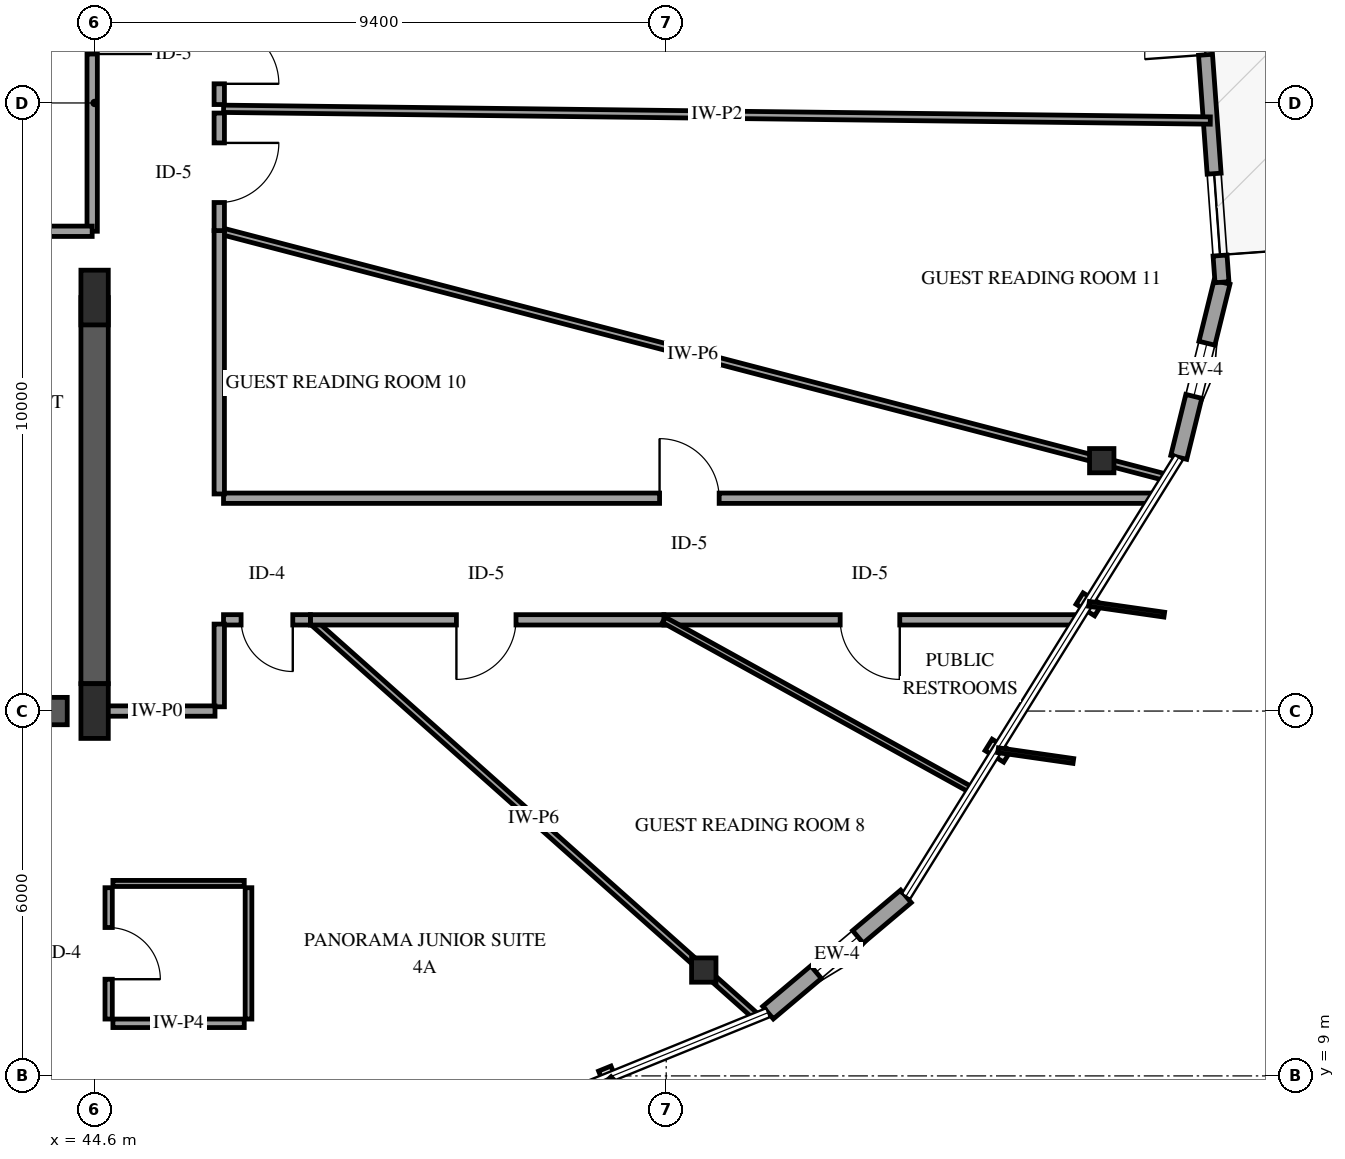
"""IFC4 building model, lengths in metres.
Left out: names, types, materials, properties, quantities, classifications, styles, units other than length and angle.
Written with IfcOpenShell. Run it as: python <this file> out.ifc"""

import sys

from ifc_helpers import new_model, si_unit, direction, frame, frame_2d, origin, origin_2d, place, context, subcontext, project, spatial, rectangle, i_section, extrude, element, fill, save


model = new_model("IFC4")
c1 = context("Model", 3, precision=1e-05, world=origin(), true_north=direction((0.0, 1.0)))
c2 = subcontext(c1, "Body", "Model", "MODEL_VIEW")
j1 = project(units=[si_unit("LENGTHUNIT", "METRE"), si_unit("PLANEANGLEUNIT", "RADIAN")], contexts=[c1])
p1 = place(None, origin())
s1 = spatial("IfcSite", under=j1, at=p1, CompositionType="ELEMENT")
p2 = place(p1, origin())
s2 = spatial("IfcBuilding", under=s1, at=p2, CompositionType="ELEMENT")
p3 = place(p2, frame((0.0, 0.0, 246.25)))
s3 = spatial("IfcBuildingStorey", under=s2, at=p3, CompositionType="ELEMENT", Elevation=246.25)
p4 = place(p3, frame((41.3, 15.0, 0.0), z_axis=(0.0, 0.0, 1.0), x_axis=(1.0, 0.0, 0.0)))
e1 = element("IfcWall", 1, at=p4, inside=s3, PredefinedType="SHEAR", context=c2, shape_type="SweptSolid", body=[
    extrude(rectangle(XDim=2.85, YDim=0.45, at=frame_2d((1.425, 0.0))), origin(), (0.0, 0.0, 1.0), 3.75),
])
p5 = place(p3, frame((44.6, 15.45, 0.0), z_axis=(0.0, 0.0, 1.0), x_axis=(0.0, 1.0, 0.0)))
e2 = element("IfcWall", 2, at=p5, inside=s3, PredefinedType="SHEAR", context=c2, shape_type="SweptSolid", body=[
    extrude(rectangle(XDim=6.35, YDim=0.45, at=frame_2d((3.175, 0.0))), origin(), (0.0, 0.0, 1.0), 3.75),
])
for number, where, z_axis, x_axis in (
    (3, (44.6, 15.0, 0.0), (0.0, 0.0, 1.0), (1.0, 0.0, 0.0)),
    (4, (44.6, 21.8, 0.0), (0.0, 0.0, 1.0), (1.0, 0.0, 0.0)),
):
    element("IfcColumn", number, at=place(p3, frame(where, z_axis=z_axis, x_axis=x_axis)), inside=s3, PredefinedType="PILASTER", context=c2, shape_type="SweptSolid", body=[
        extrude(rectangle(XDim=0.45, YDim=0.9, at=origin_2d()), origin(), (0.0, 0.0, 1.0), 3.75),
    ])
for number, where, z_axis, x_axis in (
    (5, (54.618, 10.74, 0.0), (0.0, 0.0, 1.0), (1.0, 0.0, 0.0)),
    (6, (61.163, 19.117, 0.0), (0.0, 0.0, 1.0), (1.0, 0.0, 0.0)),
):
    element("IfcColumn", number, at=place(p3, frame(where, z_axis=z_axis, x_axis=x_axis)), inside=s3, PredefinedType="COLUMN", context=c2, shape_type="SweptSolid", body=[
        extrude(i_section(OverallWidth=0.401, OverallDepth=0.399, WebThickness=0.025, FlangeThickness=0.04, FilletRadius=0.038, at=origin_2d()), origin(), (0.0, 0.0, 1.0), 3.75),
    ])
p6 = place(p3, frame((55.675, 10.04, 0.0), z_axis=(0.0, 0.0, 1.0), x_axis=(0.764511985062, 0.644609513347, 0.0)))
e7 = element("IfcWall", 7, at=p6, inside=s3, PredefinedType="SOLIDWALL", context=c2, shape_type="SweptSolid", body=[
    extrude(rectangle(XDim=2.967, YDim=0.27, at=frame_2d((1.483, 0.0))), origin(), (0.0, 0.0, 1.0), 2.829),
])
p7 = place(p6, frame((1.033, 0.0, 0.75)))
e8 = element("IfcOpeningElement", 8, at=p7, cuts=e7, PredefinedType="OPENING", context=c2, shape_type="SweptSolid", body=[
    extrude(rectangle(XDim=0.9, YDim=1.5, at=frame_2d((0.45, 0.75))), frame((0.0, 0.145, 0.0), z_axis=(0.0, -1.0, 0.0), x_axis=(1.0, 0.0, 0.0)), (0.0, 0.0, 1.0), 0.29),
])
p8 = place(p3, frame((62.429, 19.172, 0.0), z_axis=(0.0, 0.0, 1.0), x_axis=(0.23949416051, 0.970897804654, 0.0)))
e9 = element("IfcWall", 9, at=p8, inside=s3, PredefinedType="SOLIDWALL", context=c2, shape_type="SweptSolid", body=[
    extrude(rectangle(XDim=2.967, YDim=0.27, at=frame_2d((1.483, 0.0))), origin(), (0.0, 0.0, 1.0), 2.829),
])
p9 = place(p8, frame((1.033, 0.0, 0.75)))
e10 = element("IfcOpeningElement", 10, at=p9, cuts=e9, PredefinedType="OPENING", context=c2, shape_type="SweptSolid", body=[
    extrude(rectangle(XDim=0.9, YDim=1.5, at=frame_2d((0.45, 0.75))), frame((0.0, 0.145, 0.0), z_axis=(0.0, -1.0, 0.0), x_axis=(1.0, 0.0, 0.0)), (0.0, 0.0, 1.0), 0.29),
])
p10 = place(p3, frame((63.14, 22.052, 0.0), z_axis=(0.0, 0.0, 1.0), x_axis=(-0.072181914465, 0.997391483433, 0.0)))
e11 = element("IfcWall", 11, at=p10, inside=s3, PredefinedType="SOLIDWALL", context=c2, shape_type="SweptSolid", body=[
    extrude(rectangle(XDim=8.5, YDim=0.23, at=frame_2d((4.25, 0.0))), origin(), (0.0, 0.0, 1.0), 2.829),
])
p11 = place(p10, frame((3.75, 0.0, 0.0)))
e12 = element("IfcOpeningElement", 12, at=p11, cuts=e11, PredefinedType="OPENING", context=c2, shape_type="SweptSolid", body=[
    extrude(rectangle(XDim=1.0, YDim=2.15, at=frame_2d((0.5, 1.075))), frame((0.0, 0.125, 0.0), z_axis=(0.0, -1.0, 0.0), x_axis=(1.0, 0.0, 0.0)), (0.0, 0.0, 1.0), 0.25),
])
p12 = place(p10, frame((0.44, 0.0, 0.72)))
e13 = element("IfcOpeningElement", 13, at=p12, cuts=e11, PredefinedType="OPENING", context=c2, shape_type="SweptSolid", body=[
    extrude(rectangle(XDim=1.35, YDim=1.65, at=frame_2d((0.675, 0.825))), frame((0.0, 0.125, 0.0), z_axis=(0.0, -1.0, 0.0), x_axis=(1.0, 0.0, 0.0)), (0.0, 0.0, 1.0), 0.25),
])
p13 = place(p10, frame((5.39, 0.0, 0.72)))
e14 = element("IfcOpeningElement", 14, at=p13, cuts=e11, PredefinedType="OPENING", context=c2, shape_type="SweptSolid", body=[
    extrude(rectangle(XDim=1.35, YDim=1.65, at=frame_2d((0.675, 0.825))), frame((0.0, 0.125, 0.0), z_axis=(0.0, -1.0, 0.0), x_axis=(1.0, 0.0, 0.0)), (0.0, 0.0, 1.0), 0.25),
])
p14 = place(p3, frame((62.948, 24.711, 0.0), z_axis=(0.0, 0.0, 1.0), x_axis=(-0.999929192745, 0.011899978808, 0.0)))
e15 = element("IfcWall", 15, at=p14, inside=s3, PredefinedType="PARTITIONING", context=c2, shape_type="SweptSolid", body=[
    extrude(rectangle(XDim=16.228, YDim=0.12, at=frame_2d((8.114, 0.0))), origin(), (0.0, 0.0, 1.0), 3.45),
])
p15 = place(p3, frame((46.65, 22.901, 0.0), z_axis=(0.0, 0.0, 1.0), x_axis=(0.96766316622, -0.252245905303, 0.0)))
e16 = element("IfcWall", 16, at=p15, inside=s3, PredefinedType="PARTITIONING", context=c2, shape_type="SweptSolid", body=[
    extrude(rectangle(XDim=16.095, YDim=0.11, at=frame_2d((8.047, 0.0))), origin(), (0.0, 0.0, 1.0), 3.45),
])
p16 = place(p3, frame((46.72, 18.5, 0.0), z_axis=(0.0, 0.0, 1.0), x_axis=(1.0, 0.0, 0.0)))
e17 = element("IfcWall", 17, at=p16, inside=s3, PredefinedType="PARTITIONING", context=c2, shape_type="SweptSolid", body=[
    extrude(rectangle(XDim=15.292, YDim=0.17, at=frame_2d((7.646, 0.0))), origin(), (0.0, 0.0, 1.0), 2.745),
])
p17 = place(p16, frame((7.171, 0.0, 0.0)))
e18 = element("IfcOpeningElement", 18, at=p17, cuts=e17, PredefinedType="OPENING", context=c2, shape_type="SweptSolid", body=[
    extrude(rectangle(XDim=0.98, YDim=2.15, at=frame_2d((0.49, 1.075))), frame((0.0, 0.095, 0.0), z_axis=(0.0, -1.0, 0.0), x_axis=(1.0, 0.0, 0.0)), (0.0, 0.0, 1.0), 0.19),
])
p18 = place(p3, frame((48.149, 16.5, 0.0), z_axis=(0.0, 0.0, 1.0), x_axis=(0.746928074218, -0.664904844278, 0.0)))
e19 = element("IfcWall", 19, at=p18, inside=s3, PredefinedType="PARTITIONING", context=c2, shape_type="SweptSolid", body=[
    extrude(rectangle(XDim=9.828, YDim=0.11, at=frame_2d((4.914, 0.0))), origin(), (0.0, 0.0, 1.0), 2.828),
])
p19 = place(p3, frame((44.56, 29.8, 0.0), z_axis=(0.0, 0.0, 1.0), x_axis=(0.0, -1.0, 0.0)))
e20 = element("IfcWall", 20, at=p19, inside=s3, PredefinedType="PARTITIONING", context=c2, shape_type="SweptSolid", body=[
    extrude(rectangle(XDim=6.91, YDim=0.17, at=frame_2d((3.455, 0.0))), origin(), (0.0, 0.0, 1.0), 2.49),
])
p20 = place(p19, frame((2.915, 0.0, 0.0)))
e21 = element("IfcOpeningElement", 21, at=p20, cuts=e20, PredefinedType="OPENING", context=c2, shape_type="SweptSolid", body=[
    extrude(rectangle(XDim=1.08, YDim=2.15, at=frame_2d((0.54, 1.075))), frame((0.0, 0.095, 0.0), z_axis=(0.0, -1.0, 0.0), x_axis=(1.0, 0.0, 0.0)), (0.0, 0.0, 1.0), 0.19),
])
p21 = place(p3, frame((60.769, 16.5, 0.0), z_axis=(0.0, 0.0, 1.0), x_axis=(-1.0, 0.0, 0.0)))
e22 = element("IfcWall", 22, at=p21, inside=s3, PredefinedType="PARTITIONING", context=c2, shape_type="SweptSolid", body=[
    extrude(rectangle(XDim=6.807, YDim=0.17, at=frame_2d((3.404, 0.0))), origin(), (0.0, 0.0, 1.0), 3.45),
])
p22 = place(p21, frame((2.928, 0.0, 0.0)))
e23 = element("IfcOpeningElement", 23, at=p22, cuts=e22, PredefinedType="OPENING", context=c2, shape_type="SweptSolid", body=[
    extrude(rectangle(XDim=0.98, YDim=2.15, at=frame_2d((0.49, 1.075))), frame((0.0, 0.095, 0.0), z_axis=(0.0, -1.0, 0.0), x_axis=(1.0, 0.0, 0.0)), (0.0, 0.0, 1.0), 0.19),
])
p23 = place(p3, frame((53.962, 16.5, 0.0), z_axis=(0.0, 0.0, 1.0), x_axis=(-1.0, 0.0, 0.0)))
e24 = element("IfcWall", 24, at=p23, inside=s3, PredefinedType="PARTITIONING", context=c2, shape_type="SweptSolid", body=[
    extrude(rectangle(XDim=5.813, YDim=0.17, at=frame_2d((2.906, 0.0))), origin(), (0.0, 0.0, 1.0), 3.45),
])
p24 = place(p23, frame((2.432, 0.0, 0.0)))
e25 = element("IfcOpeningElement", 25, at=p24, cuts=e24, PredefinedType="OPENING", context=c2, shape_type="SweptSolid", body=[
    extrude(rectangle(XDim=0.98, YDim=2.15, at=frame_2d((0.49, 1.075))), frame((0.0, 0.095, 0.0), z_axis=(0.0, -1.0, 0.0), x_axis=(1.0, 0.0, 0.0)), (0.0, 0.0, 1.0), 0.19),
])
p25 = place(p3, frame((53.962, 16.5, 0.0), z_axis=(0.0, 0.0, 1.0), x_axis=(0.875035182715, -0.484059323855, 0.0)))
e26 = element("IfcWall", 26, at=p25, inside=s3, PredefinedType="PARTITIONING", context=c2, shape_type="SweptSolid", body=[
    extrude(rectangle(XDim=5.789, YDim=0.1, at=frame_2d((2.894, 0.0))), origin(), (0.0, 0.0, 1.0), 3.45),
])
p26 = place(p3, frame((46.65, 22.901, 0.0), z_axis=(0.0, 0.0, 1.0), x_axis=(0.0, -1.0, 0.0)))
e27 = element("IfcWall", 27, at=p26, inside=s3, PredefinedType="PARTITIONING", context=c2, shape_type="SweptSolid", body=[
    extrude(rectangle(XDim=4.331, YDim=0.17, at=frame_2d((2.166, 0.0))), origin(), (0.0, 0.0, 1.0), 3.45),
])
p27 = place(p3, frame((41.32, 22.89, 0.0), z_axis=(0.0, 0.0, 1.0), x_axis=(1.0, 0.0, 0.0)))
e28 = element("IfcWall", 28, at=p27, inside=s3, PredefinedType="PARTITIONING", context=c2, shape_type="SweptSolid", body=[
    extrude(rectangle(XDim=3.24, YDim=0.17, at=frame_2d((1.62, 0.0))), origin(), (0.0, 0.0, 1.0), 3.45),
])
p28 = place(p27, frame((1.08, 0.0, 0.0)))
e29 = element("IfcOpeningElement", 29, at=p28, cuts=e28, PredefinedType="OPENING", context=c2, shape_type="SweptSolid", body=[
    extrude(rectangle(XDim=1.08, YDim=2.15, at=frame_2d((0.54, 1.075))), frame((0.0, 0.095, 0.0), z_axis=(0.0, -1.0, 0.0), x_axis=(1.0, 0.0, 0.0)), (0.0, 0.0, 1.0), 0.19),
])
p29 = place(p3, frame((44.831, 12.095, 0.0), z_axis=(0.0, 0.0, 1.0), x_axis=(0.0, -1.0, 0.0)))
e30 = element("IfcWall", 30, at=p29, inside=s3, PredefinedType="PARTITIONING", context=c2, shape_type="SweptSolid", body=[
    extrude(rectangle(XDim=2.16, YDim=0.12, at=frame_2d((1.08, 0.0))), origin(), (0.0, 0.0, 1.0), 2.828),
])
p30 = place(p29, frame((0.655, 0.0, 0.0)))
e31 = element("IfcOpeningElement", 31, at=p30, cuts=e30, PredefinedType="OPENING", context=c2, shape_type="SweptSolid", body=[
    extrude(rectangle(XDim=0.85, YDim=2.1, at=frame_2d((0.425, 1.05))), frame((0.0, 0.07, 0.0), z_axis=(0.0, -1.0, 0.0), x_axis=(1.0, 0.0, 0.0)), (0.0, 0.0, 1.0), 0.14),
])
p31 = place(p3, frame((47.131, 9.935, 0.0), z_axis=(0.0, 0.0, 1.0), x_axis=(0.0, 1.0, 0.0)))
e32 = element("IfcWall", 32, at=p31, inside=s3, PredefinedType="PARTITIONING", context=c2, shape_type="SweptSolid", body=[
    extrude(rectangle(XDim=2.16, YDim=0.11, at=frame_2d((1.08, 0.0))), origin(), (0.0, 0.0, 1.0), 3.45),
])
p32 = place(p3, frame((47.061, 12.165, 0.0), z_axis=(0.0, 0.0, 1.0), x_axis=(-1.0, 0.0, 0.0)))
e33 = element("IfcWall", 33, at=p32, inside=s3, PredefinedType="PARTITIONING", context=c2, shape_type="SweptSolid", body=[
    extrude(rectangle(XDim=2.16, YDim=0.1, at=frame_2d((1.08, 0.0))), origin(), (0.0, 0.0, 1.0), 3.45),
])
p33 = place(p3, frame((44.901, 9.865, 0.0), z_axis=(0.0, 0.0, 1.0), x_axis=(1.0, 0.0, 0.0)))
e34 = element("IfcWall", 34, at=p33, inside=s3, PredefinedType="PARTITIONING", context=c2, shape_type="SweptSolid", body=[
    extrude(rectangle(XDim=2.16, YDim=0.14, at=frame_2d((1.08, 0.0))), origin(), (0.0, 0.0, 1.0), 3.45),
])
p34 = place(p3, frame((46.65, 24.834, 0.0), z_axis=(0.0, 0.0, 1.0), x_axis=(0.0, -1.0, 0.0)))
e35 = element("IfcWall", 35, at=p34, inside=s3, PredefinedType="PARTITIONING", context=c2, shape_type="SweptSolid", body=[
    extrude(rectangle(XDim=1.933, YDim=0.17, at=frame_2d((0.967, 0.0))), origin(), (0.0, 0.0, 1.0), 3.45),
])
p35 = place(p34, frame((0.491, 0.0, 0.0)))
e36 = element("IfcOpeningElement", 36, at=p35, cuts=e35, PredefinedType="OPENING", context=c2, shape_type="SweptSolid", body=[
    extrude(rectangle(XDim=0.98, YDim=2.15, at=frame_2d((0.49, 1.075))), frame((0.0, 0.095, 0.0), z_axis=(0.0, -1.0, 0.0), x_axis=(1.0, 0.0, 0.0)), (0.0, 0.0, 1.0), 0.19),
])
p36 = place(p3, frame((46.65, 26.665, 0.0), z_axis=(0.0, 0.0, 1.0), x_axis=(0.0, -1.0, 0.0)))
e37 = element("IfcWall", 37, at=p36, inside=s3, PredefinedType="PARTITIONING", context=c2, shape_type="SweptSolid", body=[
    extrude(rectangle(XDim=1.691, YDim=0.17, at=frame_2d((0.845, 0.0))), origin(), (0.0, 0.0, 1.0), 3.45),
])
p37 = place(p36, frame((0.37, 0.0, 0.0)))
e38 = element("IfcOpeningElement", 38, at=p37, cuts=e37, PredefinedType="OPENING", context=c2, shape_type="SweptSolid", body=[
    extrude(rectangle(XDim=0.98, YDim=2.15, at=frame_2d((0.49, 1.075))), frame((0.0, 0.095, 0.0), z_axis=(0.0, -1.0, 0.0), x_axis=(1.0, 0.0, 0.0)), (0.0, 0.0, 1.0), 0.19),
])
p38 = place(p3, frame((48.149, 16.5, 0.0), z_axis=(0.0, 0.0, 1.0), x_axis=(-1.0, 0.0, 0.0)))
e39 = element("IfcWall", 39, at=p38, inside=s3, PredefinedType="PARTITIONING", context=c2, shape_type="SweptSolid", body=[
    extrude(rectangle(XDim=1.429, YDim=0.17, at=frame_2d((0.714, 0.0))), origin(), (0.0, 0.0, 1.0), 3.45),
])
p39 = place(p38, frame((0.29, 0.0, 0.0)))
e40 = element("IfcOpeningElement", 40, at=p39, cuts=e39, PredefinedType="OPENING", context=c2, shape_type="SweptSolid", body=[
    extrude(rectangle(XDim=0.85, YDim=2.1, at=frame_2d((0.425, 1.05))), frame((0.0, 0.095, 0.0), z_axis=(0.0, -1.0, 0.0), x_axis=(1.0, 0.0, 0.0)), (0.0, 0.0, 1.0), 0.19),
])
p40 = place(p3, frame((46.65, 16.43, 0.0), z_axis=(0.0, 0.0, 1.0), x_axis=(0.0, -1.0, 0.0)))
e41 = element("IfcWall", 41, at=p40, inside=s3, PredefinedType="PARTITIONING", context=c2, shape_type="SweptSolid", body=[
    extrude(rectangle(XDim=1.36, YDim=0.17, at=frame_2d((0.68, 0.0))), origin(), (0.0, 0.0, 1.0), 3.45),
])
p41 = place(p3, frame((46.58, 15.0, 0.0), z_axis=(0.0, 0.0, 1.0), x_axis=(-1.0, 0.0, 0.0)))
e42 = element("IfcWall", 42, at=p41, inside=s3, PredefinedType="PARTITIONING", context=c2, shape_type="SweptSolid", body=[
    extrude(rectangle(XDim=1.139, YDim=0.17, at=frame_2d((0.57, 0.0))), origin(), (0.0, 0.0, 1.0), 3.45),
])
p42 = place(p3, frame((45.439, 15.0, 0.0), z_axis=(0.0, 0.0, 1.0), x_axis=(-1.0, 0.0, 0.0)))
e43 = element("IfcWall", 43, at=p42, inside=s3, PredefinedType="PARTITIONING", context=c2, shape_type="SweptSolid", body=[
    extrude(rectangle(XDim=0.769, YDim=0.17, at=frame_2d((0.385, 0.0))), origin(), (0.0, 0.0, 1.0), 3.45),
])
p43 = place(p7, origin())
e44 = element("IfcWindow", 44, at=p43, inside=s3, PartitioningType="SINGLE_PANEL", PredefinedType="WINDOW", context=c2, shape_type="SweptSolid", body=[
    extrude(rectangle(XDim=0.9, YDim=1.5, at=frame_2d((0.45, 0.75))), frame((0.0, 0.03, 0.0), z_axis=(0.0, -1.0, 0.0), x_axis=(1.0, 0.0, 0.0)), (0.0, 0.0, 1.0), 0.06),
])
fill(e8, e44)
p44 = place(p9, origin())
e45 = element("IfcWindow", 45, at=p44, inside=s3, PartitioningType="SINGLE_PANEL", PredefinedType="WINDOW", context=c2, shape_type="SweptSolid", body=[
    extrude(rectangle(XDim=0.9, YDim=1.5, at=frame_2d((0.45, 0.75))), frame((0.0, 0.03, 0.0), z_axis=(0.0, -1.0, 0.0), x_axis=(1.0, 0.0, 0.0)), (0.0, 0.0, 1.0), 0.06),
])
fill(e10, e45)
p45 = place(p11, origin())
e46 = element("IfcDoor", 46, at=p45, inside=s3, OperationType="SINGLE_SWING_LEFT", PredefinedType="DOOR", context=c2, shape_type="SweptSolid", body=[
    extrude(rectangle(XDim=1.0, YDim=2.15, at=frame_2d((0.5, 1.075))), frame((0.0, 0.025, 0.0), z_axis=(0.0, -1.0, 0.0), x_axis=(1.0, 0.0, 0.0)), (0.0, 0.0, 1.0), 0.05),
])
fill(e12, e46)
p46 = place(p12, origin())
e47 = element("IfcWindow", 47, at=p46, inside=s3, PartitioningType="SINGLE_PANEL", PredefinedType="WINDOW", context=c2, shape_type="SweptSolid", body=[
    extrude(rectangle(XDim=1.35, YDim=1.65, at=frame_2d((0.675, 0.825))), frame((0.0, 0.03, 0.0), z_axis=(0.0, -1.0, 0.0), x_axis=(1.0, 0.0, 0.0)), (0.0, 0.0, 1.0), 0.06),
])
fill(e13, e47)
p47 = place(p17, origin())
e48 = element("IfcDoor", 48, at=p47, inside=s3, OperationType="SINGLE_SWING_LEFT", PredefinedType="DOOR", context=c2, shape_type="SweptSolid", body=[
    extrude(rectangle(XDim=0.98, YDim=2.15, at=frame_2d((0.49, 1.075))), frame((0.0, 0.025, 0.0), z_axis=(0.0, -1.0, 0.0), x_axis=(1.0, 0.0, 0.0)), (0.0, 0.0, 1.0), 0.05),
])
fill(e18, e48)
p48 = place(p20, origin())
e49 = element("IfcDoor", 49, at=p48, inside=s3, OperationType="SINGLE_SWING_RIGHT", PredefinedType="DOOR", context=c2, shape_type="SweptSolid", body=[
    extrude(rectangle(XDim=1.08, YDim=2.15, at=frame_2d((0.54, 1.075))), frame((0.0, 0.025, 0.0), z_axis=(0.0, -1.0, 0.0), x_axis=(1.0, 0.0, 0.0)), (0.0, 0.0, 1.0), 0.05),
])
fill(e21, e49)
p49 = place(p22, origin())
e50 = element("IfcDoor", 50, at=p49, inside=s3, OperationType="SINGLE_SWING_LEFT", PredefinedType="DOOR", context=c2, shape_type="SweptSolid", body=[
    extrude(rectangle(XDim=0.98, YDim=2.15, at=frame_2d((0.49, 1.075))), frame((0.0, 0.025, 0.0), z_axis=(0.0, -1.0, 0.0), x_axis=(1.0, 0.0, 0.0)), (0.0, 0.0, 1.0), 0.05),
])
fill(e23, e50)
p50 = place(p24, origin())
e51 = element("IfcDoor", 51, at=p50, inside=s3, OperationType="SINGLE_SWING_RIGHT", PredefinedType="DOOR", context=c2, shape_type="SweptSolid", body=[
    extrude(rectangle(XDim=0.98, YDim=2.15, at=frame_2d((0.49, 1.075))), frame((0.0, 0.025, 0.0), z_axis=(0.0, -1.0, 0.0), x_axis=(1.0, 0.0, 0.0)), (0.0, 0.0, 1.0), 0.05),
])
fill(e25, e51)
p51 = place(p30, origin())
e52 = element("IfcDoor", 52, at=p51, inside=s3, OperationType="SINGLE_SWING_RIGHT", PredefinedType="DOOR", context=c2, shape_type="SweptSolid", body=[
    extrude(rectangle(XDim=0.85, YDim=2.1, at=frame_2d((0.425, 1.05))), frame((0.0, 0.025, 0.0), z_axis=(0.0, -1.0, 0.0), x_axis=(1.0, 0.0, 0.0)), (0.0, 0.0, 1.0), 0.05),
])
fill(e31, e52)
p52 = place(p35, origin())
e53 = element("IfcDoor", 53, at=p52, inside=s3, OperationType="SINGLE_SWING_LEFT", PredefinedType="DOOR", context=c2, shape_type="SweptSolid", body=[
    extrude(rectangle(XDim=0.98, YDim=2.15, at=frame_2d((0.49, 1.075))), frame((0.0, 0.025, 0.0), z_axis=(0.0, -1.0, 0.0), x_axis=(1.0, 0.0, 0.0)), (0.0, 0.0, 1.0), 0.05),
])
fill(e36, e53)
p53 = place(p37, origin())
e54 = element("IfcDoor", 54, at=p53, inside=s3, OperationType="SINGLE_SWING_RIGHT", PredefinedType="DOOR", context=c2, shape_type="SweptSolid", body=[
    extrude(rectangle(XDim=0.98, YDim=2.15, at=frame_2d((0.49, 1.075))), frame((0.0, 0.025, 0.0), z_axis=(0.0, -1.0, 0.0), x_axis=(1.0, 0.0, 0.0)), (0.0, 0.0, 1.0), 0.05),
])
fill(e38, e54)
p54 = place(p39, origin())
e55 = element("IfcDoor", 55, at=p54, inside=s3, OperationType="SINGLE_SWING_LEFT", PredefinedType="DOOR", context=c2, shape_type="SweptSolid", body=[
    extrude(rectangle(XDim=0.85, YDim=2.1, at=frame_2d((0.425, 1.05))), frame((0.0, 0.025, 0.0), z_axis=(0.0, -1.0, 0.0), x_axis=(1.0, 0.0, 0.0)), (0.0, 0.0, 1.0), 0.05),
])
fill(e40, e55)
save(model, sys.argv[1])
